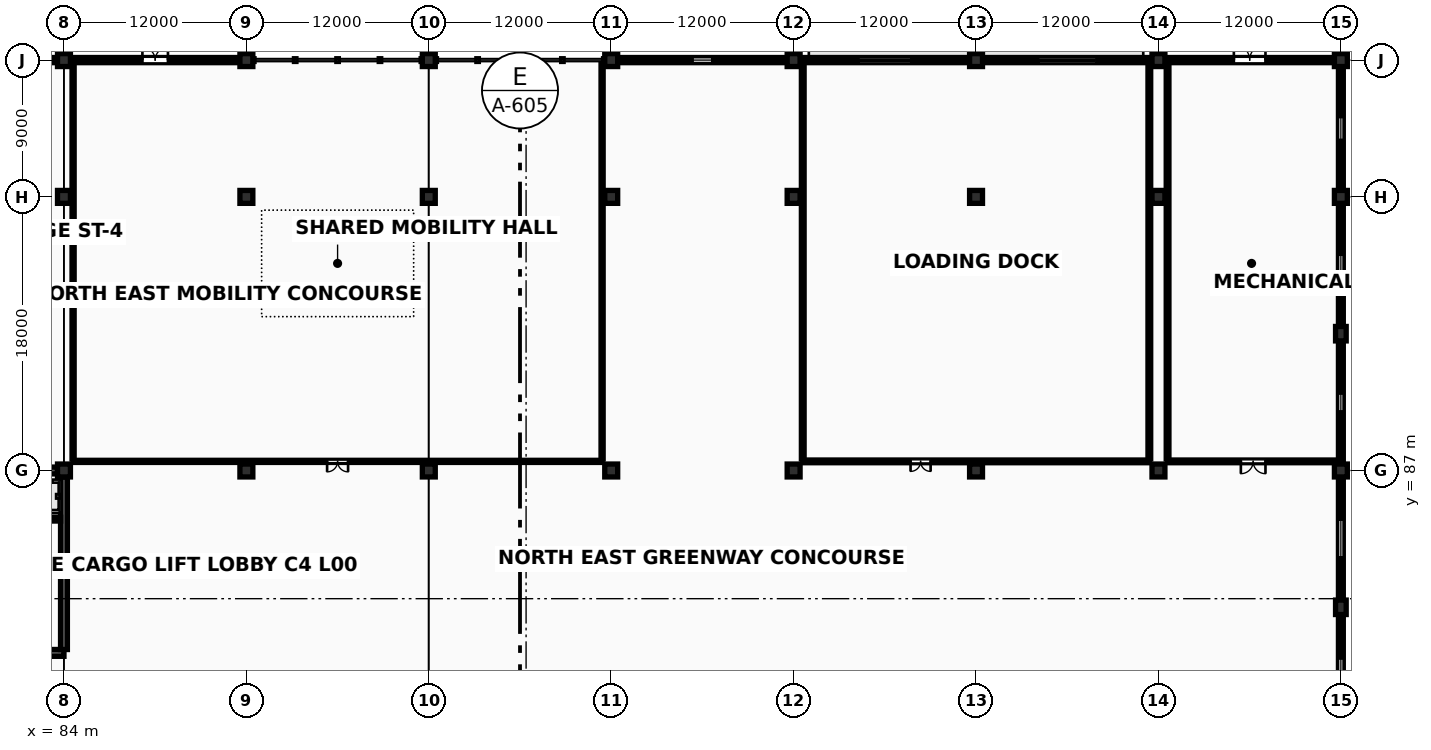
"""IFC4 building model, lengths in metres.
Left out: names, types, materials, properties, quantities, classifications, styles, units other than length and angle.
Written with IfcOpenShell. Run it as: python <this file> out.ifc"""

import sys

from ifc_helpers import new_model, si_unit, direction, frame, frame_2d, origin, origin_2d, place, context, subcontext, project, spatial, rectangle, extrude, element, fill, save


model = new_model("IFC4")
c1 = context("Model", 3, precision=1e-05, world=origin(), true_north=direction((0.0, 1.0)))
c2 = subcontext(c1, "Body", "Model", "MODEL_VIEW")
j1 = project(units=[si_unit("LENGTHUNIT", "METRE"), si_unit("PLANEANGLEUNIT", "RADIAN")], contexts=[c1])
p1 = place(None, origin())
s1 = spatial("IfcSite", under=j1, at=p1, CompositionType="ELEMENT")
p2 = place(p1, origin())
s2 = spatial("IfcBuilding", under=s1, at=p2, CompositionType="ELEMENT")
p3 = place(p2, origin())
s3 = spatial("IfcBuildingStorey", under=s2, at=p3, CompositionType="ELEMENT", Elevation=0.0)
for number, where, z_axis, x_axis in (
    (1, (84.0, 87.0, 0.0), (0.0, 0.0, 1.0), (1.0, 0.0, 0.0)),
    (2, (84.0, 105.0, 0.0), (0.0, 0.0, 1.0), (1.0, 0.0, 0.0)),
    (3, (84.0, 114.0, 0.0), (0.0, 0.0, 1.0), (1.0, 0.0, 0.0)),
    (4, (96.0, 87.0, 0.0), (0.0, 0.0, 1.0), (1.0, 0.0, 0.0)),
    (5, (96.0, 105.0, 0.0), (0.0, 0.0, 1.0), (1.0, 0.0, 0.0)),
    (6, (96.0, 114.0, 0.0), (0.0, 0.0, 1.0), (1.0, 0.0, 0.0)),
    (7, (108.0, 87.0, 0.0), (0.0, 0.0, 1.0), (1.0, 0.0, 0.0)),
    (8, (108.0, 105.0, 0.0), (0.0, 0.0, 1.0), (1.0, 0.0, 0.0)),
    (9, (108.0, 114.0, 0.0), (0.0, 0.0, 1.0), (1.0, 0.0, 0.0)),
    (10, (120.0, 87.0, 0.0), (0.0, 0.0, 1.0), (1.0, 0.0, 0.0)),
    (11, (120.0, 105.0, 0.0), (0.0, 0.0, 1.0), (1.0, 0.0, 0.0)),
    (12, (120.0, 114.0, 0.0), (0.0, 0.0, 1.0), (1.0, 0.0, 0.0)),
    (13, (132.0, 87.0, 0.0), (0.0, 0.0, 1.0), (1.0, 0.0, 0.0)),
    (14, (132.0, 105.0, 0.0), (0.0, 0.0, 1.0), (1.0, 0.0, 0.0)),
    (15, (132.0, 114.0, 0.0), (0.0, 0.0, 1.0), (1.0, 0.0, 0.0)),
    (16, (144.0, 87.0, 0.0), (0.0, 0.0, 1.0), (1.0, 0.0, 0.0)),
    (17, (144.0, 105.0, 0.0), (0.0, 0.0, 1.0), (1.0, 0.0, 0.0)),
    (18, (144.0, 114.0, 0.0), (0.0, 0.0, 1.0), (1.0, 0.0, 0.0)),
    (19, (156.0, 87.0, 0.0), (0.0, 0.0, 1.0), (1.0, 0.0, 0.0)),
    (20, (156.0, 105.0, 0.0), (0.0, 0.0, 1.0), (1.0, 0.0, 0.0)),
    (21, (156.0, 114.0, 0.0), (0.0, 0.0, 1.0), (1.0, 0.0, 0.0)),
    (22, (168.0, 87.0, 0.0), (0.0, 0.0, 1.0), (1.0, 0.0, 0.0)),
    (23, (168.0, 105.0, 0.0), (0.0, 0.0, 1.0), (1.0, 0.0, 0.0)),
    (24, (168.0, 114.0, 0.0), (0.0, 0.0, 1.0), (1.0, 0.0, 0.0)),
):
    element("IfcColumn", number, at=place(p3, frame(where, z_axis=z_axis, x_axis=x_axis)), inside=s3, PredefinedType="COLUMN", context=c2, shape_type="SweptSolid", body=[
        extrude(rectangle(XDim=0.85, YDim=0.85, at=origin_2d()), origin(), (0.0, 0.0, 1.0), 5.4),
    ])
for number, where, z_axis, x_axis in (
    (25, (168.0, 78.0, 0.0), (0.0, 0.0, 1.0), (1.0, 0.0, 0.0)),
    (26, (168.0, 96.0, 0.0), (0.0, 0.0, 1.0), (1.0, 0.0, 0.0)),
):
    element("IfcColumn", number, at=place(p3, frame(where, z_axis=z_axis, x_axis=x_axis)), inside=s3, PredefinedType="PILASTER", context=c2, shape_type="SweptSolid", body=[
        extrude(rectangle(XDim=0.7, YDim=0.95, at=origin_2d()), origin(), (0.0, 0.0, 1.0), 5.4),
    ])
p4 = place(p3, frame((72.0, 75.0, 0.0), z_axis=(0.0, 0.0, 1.0), x_axis=(1.0, 0.0, 0.0)))
e27 = element("IfcWall", 27, at=p4, inside=s3, PredefinedType="SHEAR", context=c2, shape_type="SweptSolid", body=[
    extrude(rectangle(XDim=12.0, YDim=0.45, at=frame_2d((6.0, 0.0))), origin(), (0.0, 0.0, 1.0), 5.203),
])
p5 = place(p4, frame((7.45, 0.0, 0.0)))
e28 = element("IfcOpeningElement", 28, at=p5, cuts=e27, PredefinedType="OPENING", context=c2, shape_type="SweptSolid", body=[
    extrude(rectangle(XDim=1.5, YDim=2.25, at=frame_2d((0.75, 1.125))), frame((0.0, 0.24, 0.0), z_axis=(0.0, -1.0, 0.0), x_axis=(1.0, 0.0, 0.0)), (0.0, 0.0, 1.0), 0.48),
])
p6 = place(p3, frame((72.422, 87.0, 0.0), z_axis=(0.0, 0.0, 1.0), x_axis=(1.0, 0.0, 0.0)))
e29 = element("IfcWall", 29, at=p6, inside=s3, PredefinedType="SHEAR", context=c2, shape_type="SweptSolid", body=[
    extrude(rectangle(XDim=11.156, YDim=0.45, at=frame_2d((5.578, 0.0))), origin(), (0.0, 0.0, 1.0), 5.203),
])
p7 = place(p6, frame((1.178, 0.0, 0.0)))
e30 = element("IfcOpeningElement", 30, at=p7, cuts=e29, PredefinedType="OPENING", context=c2, shape_type="SweptSolid", body=[
    extrude(rectangle(XDim=1.2, YDim=2.2, at=frame_2d((0.6, 1.1))), frame((0.0, 0.24, 0.0), z_axis=(0.0, -1.0, 0.0), x_axis=(1.0, 0.0, 0.0)), (0.0, 0.0, 1.0), 0.48),
])
p8 = place(p3, frame((84.0, 75.222, 0.0), z_axis=(0.0, 0.0, 1.0), x_axis=(0.0, 1.0, 0.0)))
e31 = element("IfcWall", 31, at=p8, inside=s3, PredefinedType="SHEAR", context=c2, shape_type="SweptSolid", body=[
    extrude(rectangle(XDim=11.356, YDim=0.45, at=frame_2d((5.678, 0.0))), origin(), (0.0, 0.0, 1.0), 5.203),
])
p9 = place(p3, frame((76.597, 83.8, 0.0), z_axis=(0.0, 0.0, 1.0), x_axis=(1.0, 0.0, 0.0)))
e32 = element("IfcWall", 32, at=p9, inside=s3, PredefinedType="SOLIDWALL", context=c2, shape_type="SweptSolid", body=[
    extrude(rectangle(XDim=7.181, YDim=0.25, at=frame_2d((3.591, 0.0))), origin(), (0.0, 0.0, 1.0), 5.203),
])
p10 = place(p9, frame((2.433, 0.0, 0.0)))
e33 = element("IfcOpeningElement", 33, at=p10, cuts=e32, PredefinedType="OPENING", context=c2, shape_type="SweptSolid", body=[
    extrude(rectangle(XDim=1.3, YDim=2.28, at=frame_2d((0.65, 1.14))), frame((0.0, 0.14, 0.0), z_axis=(0.0, -1.0, 0.0), x_axis=(1.0, 0.0, 0.0)), (0.0, 0.0, 1.0), 0.28),
])
p11 = place(p9, frame((5.203, 0.0, 0.0)))
e34 = element("IfcOpeningElement", 34, at=p11, cuts=e32, PredefinedType="OPENING", context=c2, shape_type="SweptSolid", body=[
    extrude(rectangle(XDim=1.3, YDim=2.28, at=frame_2d((0.65, 1.14))), frame((0.0, 0.14, 0.0), z_axis=(0.0, -1.0, 0.0), x_axis=(1.0, 0.0, 0.0)), (0.0, 0.0, 1.0), 0.28),
])
p12 = place(p3, frame((72.423, 114.0, 0.0), z_axis=(0.0, 0.0, 1.0), x_axis=(1.0, 0.0, 0.0)))
e35 = element("IfcWall", 35, at=p12, inside=s3, PredefinedType="SOLIDWALL", context=c2, shape_type="SweptSolid", body=[
    extrude(rectangle(XDim=11.154, YDim=0.34, at=frame_2d((5.577, 0.0))), origin(), (0.0, 0.0, 1.0), 3.85),
])
p13 = place(p12, frame((4.797, 0.0, 0.0)))
e36 = element("IfcOpeningElement", 36, at=p13, cuts=e35, PredefinedType="OPENING", context=c2, shape_type="SweptSolid", body=[
    extrude(rectangle(XDim=1.56, YDim=2.3, at=frame_2d((0.78, 1.15))), frame((0.0, 0.185, 0.0), z_axis=(0.0, -1.0, 0.0), x_axis=(1.0, 0.0, 0.0)), (0.0, 0.0, 1.0), 0.37),
])
p14 = place(p3, frame((84.423, 114.0, 0.0), z_axis=(0.0, 0.0, 1.0), x_axis=(1.0, 0.0, 0.0)))
e37 = element("IfcWall", 37, at=p14, inside=s3, PredefinedType="SOLIDWALL", context=c2, shape_type="SweptSolid", body=[
    extrude(rectangle(XDim=11.154, YDim=0.34, at=frame_2d((5.577, 0.0))), origin(), (0.0, 0.0, 1.0), 3.85),
])
p15 = place(p14, frame((4.737, 0.0, 0.0)))
e38 = element("IfcOpeningElement", 38, at=p15, cuts=e37, PredefinedType="OPENING", context=c2, shape_type="SweptSolid", body=[
    extrude(rectangle(XDim=1.68, YDim=2.34, at=frame_2d((0.84, 1.17))), frame((0.0, 0.185, 0.0), z_axis=(0.0, -1.0, 0.0), x_axis=(1.0, 0.0, 0.0)), (0.0, 0.0, 1.0), 0.37),
])
p16 = place(p3, frame((120.423, 114.0, 0.0), z_axis=(0.0, 0.0, 1.0), x_axis=(1.0, 0.0, 0.0)))
e39 = element("IfcWall", 39, at=p16, inside=s3, PredefinedType="SOLIDWALL", context=c2, shape_type="SweptSolid", body=[
    extrude(rectangle(XDim=11.154, YDim=0.34, at=frame_2d((5.577, 0.0))), origin(), (0.0, 0.0, 1.0), 3.85),
])
p17 = place(p16, frame((4.927, 0.0, 0.85)))
e40 = element("IfcOpeningElement", 40, at=p17, cuts=e39, PredefinedType="OPENING", context=c2, shape_type="SweptSolid", body=[
    extrude(rectangle(XDim=1.3, YDim=1.25, at=frame_2d((0.65, 0.625))), frame((0.0, 0.185, 0.0), z_axis=(0.0, -1.0, 0.0), x_axis=(1.0, 0.0, 0.0)), (0.0, 0.0, 1.0), 0.37),
])
p18 = place(p3, frame((132.423, 114.0, 0.0), z_axis=(0.0, 0.0, 1.0), x_axis=(1.0, 0.0, 0.0)))
e41 = element("IfcWall", 41, at=p18, inside=s3, PredefinedType="SOLIDWALL", context=c2, shape_type="SweptSolid", body=[
    extrude(rectangle(XDim=11.154, YDim=0.34, at=frame_2d((5.577, 0.0))), origin(), (0.0, 0.0, 1.0), 3.85),
])
p19 = place(p18, frame((3.877, 0.0, 0.0)))
e42 = element("IfcOpeningElement", 42, at=p19, cuts=e41, PredefinedType="OPENING", context=c2, shape_type="SweptSolid", body=[
    extrude(rectangle(XDim=3.4, YDim=2.85, at=frame_2d((1.7, 1.425))), frame((0.0, 0.185, 0.0), z_axis=(0.0, -1.0, 0.0), x_axis=(1.0, 0.0, 0.0)), (0.0, 0.0, 1.0), 0.37),
])
p20 = place(p3, frame((144.423, 114.0, 0.0), z_axis=(0.0, 0.0, 1.0), x_axis=(1.0, 0.0, 0.0)))
e43 = element("IfcWall", 43, at=p20, inside=s3, PredefinedType="SOLIDWALL", context=c2, shape_type="SweptSolid", body=[
    extrude(rectangle(XDim=11.154, YDim=0.34, at=frame_2d((5.577, 0.0))), origin(), (0.0, 0.0, 1.0), 3.85),
])
p21 = place(p20, frame((3.697, 0.0, 0.0)))
e44 = element("IfcOpeningElement", 44, at=p21, cuts=e43, PredefinedType="OPENING", context=c2, shape_type="SweptSolid", body=[
    extrude(rectangle(XDim=3.76, YDim=3.0, at=frame_2d((1.88, 1.5))), frame((0.0, 0.185, 0.0), z_axis=(0.0, -1.0, 0.0), x_axis=(1.0, 0.0, 0.0)), (0.0, 0.0, 1.0), 0.37),
])
p22 = place(p3, frame((156.423, 114.0, 0.0), z_axis=(0.0, 0.0, 1.0), x_axis=(1.0, 0.0, 0.0)))
e45 = element("IfcWall", 45, at=p22, inside=s3, PredefinedType="SOLIDWALL", context=c2, shape_type="SweptSolid", body=[
    extrude(rectangle(XDim=11.154, YDim=0.34, at=frame_2d((5.577, 0.0))), origin(), (0.0, 0.0, 1.0), 3.85),
])
p23 = place(p22, frame((4.537, 0.0, 0.0)))
e46 = element("IfcOpeningElement", 46, at=p23, cuts=e45, PredefinedType="OPENING", context=c2, shape_type="SweptSolid", body=[
    extrude(rectangle(XDim=2.08, YDim=2.44, at=frame_2d((1.04, 1.22))), frame((0.0, 0.185, 0.0), z_axis=(0.0, -1.0, 0.0), x_axis=(1.0, 0.0, 0.0)), (0.0, 0.0, 1.0), 0.37),
])
p24 = place(p3, frame((168.0, 69.423, 0.0), z_axis=(0.0, 0.0, 1.0), x_axis=(0.0, 1.0, 0.0)))
e47 = element("IfcWall", 47, at=p24, inside=s3, PredefinedType="SOLIDWALL", context=c2, shape_type="SweptSolid", body=[
    extrude(rectangle(XDim=8.104, YDim=0.32, at=frame_2d((4.052, 0.0))), origin(), (0.0, 0.0, 1.0), 3.85),
])
p25 = place(p24, frame((2.892, 0.0, 0.55)))
e48 = element("IfcOpeningElement", 48, at=p25, cuts=e47, PredefinedType="OPENING", context=c2, shape_type="SweptSolid", body=[
    extrude(rectangle(XDim=2.32, YDim=1.42, at=frame_2d((1.16, 0.71))), frame((0.0, 0.175, 0.0), z_axis=(0.0, -1.0, 0.0), x_axis=(1.0, 0.0, 0.0)), (0.0, 0.0, 1.0), 0.35),
])
p26 = place(p3, frame((168.0, 78.473, 0.0), z_axis=(0.0, 0.0, 1.0), x_axis=(0.0, 1.0, 0.0)))
e49 = element("IfcWall", 49, at=p26, inside=s3, PredefinedType="SOLIDWALL", context=c2, shape_type="SweptSolid", body=[
    extrude(rectangle(XDim=8.104, YDim=0.32, at=frame_2d((4.052, 0.0))), origin(), (0.0, 0.0, 1.0), 3.85),
])
p27 = place(p26, frame((2.812, 0.0, 0.55)))
e50 = element("IfcOpeningElement", 50, at=p27, cuts=e49, PredefinedType="OPENING", context=c2, shape_type="SweptSolid", body=[
    extrude(rectangle(XDim=2.48, YDim=1.42, at=frame_2d((1.24, 0.71))), frame((0.0, 0.175, 0.0), z_axis=(0.0, -1.0, 0.0), x_axis=(1.0, 0.0, 0.0)), (0.0, 0.0, 1.0), 0.35),
])
p28 = place(p3, frame((168.0, 87.423, 0.0), z_axis=(0.0, 0.0, 1.0), x_axis=(0.0, 1.0, 0.0)))
e51 = element("IfcWall", 51, at=p28, inside=s3, PredefinedType="SOLIDWALL", context=c2, shape_type="SweptSolid", body=[
    extrude(rectangle(XDim=8.104, YDim=0.32, at=frame_2d((4.052, 0.0))), origin(), (0.0, 0.0, 1.0), 3.85),
])
p29 = place(p28, frame((3.462, 0.0, 0.55)))
e52 = element("IfcOpeningElement", 52, at=p29, cuts=e51, PredefinedType="OPENING", context=c2, shape_type="SweptSolid", body=[
    extrude(rectangle(XDim=1.18, YDim=1.58, at=frame_2d((0.59, 0.79))), frame((0.0, 0.175, 0.0), z_axis=(0.0, -1.0, 0.0), x_axis=(1.0, 0.0, 0.0)), (0.0, 0.0, 1.0), 0.35),
])
p30 = place(p3, frame((168.0, 96.473, 0.0), z_axis=(0.0, 0.0, 1.0), x_axis=(0.0, 1.0, 0.0)))
e53 = element("IfcWall", 53, at=p30, inside=s3, PredefinedType="SOLIDWALL", context=c2, shape_type="SweptSolid", body=[
    extrude(rectangle(XDim=8.104, YDim=0.32, at=frame_2d((4.052, 0.0))), origin(), (0.0, 0.0, 1.0), 3.85),
])
p31 = place(p30, frame((3.382, 0.0, 0.55)))
e54 = element("IfcOpeningElement", 54, at=p31, cuts=e53, PredefinedType="OPENING", context=c2, shape_type="SweptSolid", body=[
    extrude(rectangle(XDim=1.34, YDim=1.58, at=frame_2d((0.67, 0.79))), frame((0.0, 0.175, 0.0), z_axis=(0.0, -1.0, 0.0), x_axis=(1.0, 0.0, 0.0)), (0.0, 0.0, 1.0), 0.35),
])
p32 = place(p3, frame((168.0, 105.423, 0.0), z_axis=(0.0, 0.0, 1.0), x_axis=(0.0, 1.0, 0.0)))
e55 = element("IfcWall", 55, at=p32, inside=s3, PredefinedType="SOLIDWALL", context=c2, shape_type="SweptSolid", body=[
    extrude(rectangle(XDim=8.154, YDim=0.32, at=frame_2d((4.077, 0.0))), origin(), (0.0, 0.0, 1.0), 3.85),
])
p33 = place(p32, frame((3.327, 0.0, 0.55)))
e56 = element("IfcOpeningElement", 56, at=p33, cuts=e55, PredefinedType="OPENING", context=c2, shape_type="SweptSolid", body=[
    extrude(rectangle(XDim=1.5, YDim=1.58, at=frame_2d((0.75, 0.79))), frame((0.0, 0.175, 0.0), z_axis=(0.0, -1.0, 0.0), x_axis=(1.0, 0.0, 0.0)), (0.0, 0.0, 1.0), 0.35),
])
p34 = place(p3, frame((84.6, 87.6, 0.0), z_axis=(0.0, 0.0, 1.0), x_axis=(1.0, 0.0, 0.0)))
e57 = element("IfcWall", 57, at=p34, inside=s3, PredefinedType="PARTITIONING", context=c2, shape_type="SweptSolid", body=[
    extrude(rectangle(XDim=34.8, YDim=0.14, at=frame_2d((17.4, 0.0))), origin(), (0.0, 0.0, 1.0), 2.75),
])
p35 = place(p34, frame((16.71, 0.0, 0.0)))
e58 = element("IfcOpeningElement", 58, at=p35, cuts=e57, PredefinedType="OPENING", context=c2, shape_type="SweptSolid", body=[
    extrude(rectangle(XDim=1.38, YDim=2.23, at=frame_2d((0.69, 1.115))), frame((0.0, 0.085, 0.0), z_axis=(0.0, -1.0, 0.0), x_axis=(1.0, 0.0, 0.0)), (0.0, 0.0, 1.0), 0.17),
])
for number, where, z_axis, x_axis in (
    (59, (84.6, 87.76, 0.0), (0.0, 0.0, 1.0), (0.0, 1.0, 0.0)),
    (60, (119.4, 87.76, 0.0), (0.0, 0.0, 1.0), (0.0, 1.0, 0.0)),
):
    element("IfcWall", number, at=place(p3, frame(where, z_axis=z_axis, x_axis=x_axis)), inside=s3, PredefinedType="PARTITIONING", context=c2, shape_type="SweptSolid", body=[
        extrude(rectangle(XDim=26.1, YDim=0.14, at=frame_2d((13.05, 0.0))), origin(), (0.0, 0.0, 1.0), 2.75),
    ])
p36 = place(p3, frame((132.6, 87.6, 0.0), z_axis=(0.0, 0.0, 1.0), x_axis=(1.0, 0.0, 0.0)))
e61 = element("IfcWall", 61, at=p36, inside=s3, PredefinedType="SOLIDWALL", context=c2, shape_type="SweptSolid", body=[
    extrude(rectangle(XDim=22.8, YDim=0.18, at=frame_2d((11.4, 0.0))), origin(), (0.0, 0.0, 1.0), 2.75),
])
p37 = place(p36, frame((7.092, 0.0, 0.0)))
e62 = element("IfcOpeningElement", 62, at=p37, cuts=e61, PredefinedType="OPENING", context=c2, shape_type="SweptSolid", body=[
    extrude(rectangle(XDim=1.32, YDim=2.26, at=frame_2d((0.66, 1.13))), frame((0.0, 0.105, 0.0), z_axis=(0.0, -1.0, 0.0), x_axis=(1.0, 0.0, 0.0)), (0.0, 0.0, 1.0), 0.21),
])
for number, where, z_axis, x_axis in (
    (63, (132.6, 87.76, 0.0), (0.0, 0.0, 1.0), (0.0, 1.0, 0.0)),
    (64, (155.4, 87.76, 0.0), (0.0, 0.0, 1.0), (0.0, 1.0, 0.0)),
):
    element("IfcWall", number, at=place(p3, frame(where, z_axis=z_axis, x_axis=x_axis)), inside=s3, PredefinedType="SOLIDWALL", context=c2, shape_type="SweptSolid", body=[
        extrude(rectangle(XDim=26.1, YDim=0.18, at=frame_2d((13.05, 0.0))), origin(), (0.0, 0.0, 1.0), 2.75),
    ])
p38 = place(p3, frame((156.6, 87.6, 0.0), z_axis=(0.0, 0.0, 1.0), x_axis=(1.0, 0.0, 0.0)))
e65 = element("IfcWall", 65, at=p38, inside=s3, PredefinedType="SOLIDWALL", context=c2, shape_type="SweptSolid", body=[
    extrude(rectangle(XDim=11.26, YDim=0.18, at=frame_2d((5.63, 0.0))), origin(), (0.0, 0.0, 1.0), 2.75),
])
p39 = place(p38, frame((4.82, 0.0, 0.0)))
e66 = element("IfcOpeningElement", 66, at=p39, cuts=e65, PredefinedType="OPENING", context=c2, shape_type="SweptSolid", body=[
    extrude(rectangle(XDim=1.62, YDim=2.3, at=frame_2d((0.81, 1.15))), frame((0.0, 0.105, 0.0), z_axis=(0.0, -1.0, 0.0), x_axis=(1.0, 0.0, 0.0)), (0.0, 0.0, 1.0), 0.21),
])
p40 = place(p3, frame((156.6, 87.76, 0.0), z_axis=(0.0, 0.0, 1.0), x_axis=(0.0, 1.0, 0.0)))
e67 = element("IfcWall", 67, at=p40, inside=s3, PredefinedType="SOLIDWALL", context=c2, shape_type="SweptSolid", body=[
    extrude(rectangle(XDim=26.1, YDim=0.18, at=frame_2d((13.05, 0.0))), origin(), (0.0, 0.0, 1.0), 2.75),
])
p41 = place(p15, origin())
e68 = element("IfcDoor", 68, at=p41, inside=s3, OperationType="DOUBLE_DOOR_SINGLE_SWING", PredefinedType="DOOR", context=c2, shape_type="SweptSolid", body=[
    extrude(rectangle(XDim=1.68, YDim=2.34, at=frame_2d((0.84, 1.17))), frame((0.0, 0.025, 0.0), z_axis=(0.0, -1.0, 0.0), x_axis=(1.0, 0.0, 0.0)), (0.0, 0.0, 1.0), 0.05),
])
fill(e38, e68)
p42 = place(p17, origin())
e69 = element("IfcWindow", 69, at=p42, inside=s3, PartitioningType="SINGLE_PANEL", PredefinedType="WINDOW", context=c2, shape_type="SweptSolid", body=[
    extrude(rectangle(XDim=1.3, YDim=1.25, at=frame_2d((0.65, 0.625))), frame((0.0, 0.03, 0.0), z_axis=(0.0, -1.0, 0.0), x_axis=(1.0, 0.0, 0.0)), (0.0, 0.0, 1.0), 0.06),
])
fill(e40, e69)
p43 = place(p19, origin())
e70 = element("IfcDoor", 70, at=p43, inside=s3, OperationType="ROLLINGUP", PredefinedType="USERDEFINED", context=c2, shape_type="SweptSolid", body=[
    extrude(rectangle(XDim=3.4, YDim=2.85, at=frame_2d((1.7, 1.425))), frame((0.0, 0.025, 0.0), z_axis=(0.0, -1.0, 0.0), x_axis=(1.0, 0.0, 0.0)), (0.0, 0.0, 1.0), 0.05),
])
fill(e42, e70)
p44 = place(p21, origin())
e71 = element("IfcDoor", 71, at=p44, inside=s3, OperationType="ROLLINGUP", PredefinedType="USERDEFINED", context=c2, shape_type="SweptSolid", body=[
    extrude(rectangle(XDim=3.76, YDim=3.0, at=frame_2d((1.88, 1.5))), frame((0.0, 0.025, 0.0), z_axis=(0.0, -1.0, 0.0), x_axis=(1.0, 0.0, 0.0)), (0.0, 0.0, 1.0), 0.05),
])
fill(e44, e71)
p45 = place(p23, origin())
e72 = element("IfcDoor", 72, at=p45, inside=s3, OperationType="DOUBLE_DOOR_SINGLE_SWING", PredefinedType="DOOR", context=c2, shape_type="SweptSolid", body=[
    extrude(rectangle(XDim=2.08, YDim=2.44, at=frame_2d((1.04, 1.22))), frame((0.0, 0.025, 0.0), z_axis=(0.0, -1.0, 0.0), x_axis=(1.0, 0.0, 0.0)), (0.0, 0.0, 1.0), 0.05),
])
fill(e46, e72)
p46 = place(p25, origin())
e73 = element("IfcWindow", 73, at=p46, inside=s3, PartitioningType="DOUBLE_PANEL_VERTICAL", PredefinedType="WINDOW", context=c2, shape_type="SweptSolid", body=[
    extrude(rectangle(XDim=2.32, YDim=1.42, at=frame_2d((1.16, 0.71))), frame((0.0, 0.03, 0.0), z_axis=(0.0, -1.0, 0.0), x_axis=(1.0, 0.0, 0.0)), (0.0, 0.0, 1.0), 0.06),
])
fill(e48, e73)
p47 = place(p27, origin())
e74 = element("IfcWindow", 74, at=p47, inside=s3, PartitioningType="DOUBLE_PANEL_VERTICAL", PredefinedType="WINDOW", context=c2, shape_type="SweptSolid", body=[
    extrude(rectangle(XDim=2.48, YDim=1.42, at=frame_2d((1.24, 0.71))), frame((0.0, 0.03, 0.0), z_axis=(0.0, -1.0, 0.0), x_axis=(1.0, 0.0, 0.0)), (0.0, 0.0, 1.0), 0.06),
])
fill(e50, e74)
p48 = place(p29, origin())
e75 = element("IfcWindow", 75, at=p48, inside=s3, PartitioningType="SINGLE_PANEL", PredefinedType="WINDOW", context=c2, shape_type="SweptSolid", body=[
    extrude(rectangle(XDim=1.18, YDim=1.58, at=frame_2d((0.59, 0.79))), frame((0.0, 0.03, 0.0), z_axis=(0.0, -1.0, 0.0), x_axis=(1.0, 0.0, 0.0)), (0.0, 0.0, 1.0), 0.06),
])
fill(e52, e75)
p49 = place(p31, origin())
e76 = element("IfcWindow", 76, at=p49, inside=s3, PartitioningType="SINGLE_PANEL", PredefinedType="WINDOW", context=c2, shape_type="SweptSolid", body=[
    extrude(rectangle(XDim=1.34, YDim=1.58, at=frame_2d((0.67, 0.79))), frame((0.0, 0.03, 0.0), z_axis=(0.0, -1.0, 0.0), x_axis=(1.0, 0.0, 0.0)), (0.0, 0.0, 1.0), 0.06),
])
fill(e54, e76)
p50 = place(p33, origin())
e77 = element("IfcWindow", 77, at=p50, inside=s3, PartitioningType="SINGLE_PANEL", PredefinedType="WINDOW", context=c2, shape_type="SweptSolid", body=[
    extrude(rectangle(XDim=1.5, YDim=1.58, at=frame_2d((0.75, 0.79))), frame((0.0, 0.03, 0.0), z_axis=(0.0, -1.0, 0.0), x_axis=(1.0, 0.0, 0.0)), (0.0, 0.0, 1.0), 0.06),
])
fill(e56, e77)
p51 = place(p35, origin())
e78 = element("IfcDoor", 78, at=p51, inside=s3, OperationType="DOUBLE_DOOR_SINGLE_SWING", PredefinedType="DOOR", context=c2, shape_type="SweptSolid", body=[
    extrude(rectangle(XDim=1.38, YDim=2.23, at=frame_2d((0.69, 1.115))), frame((0.0, 0.025, 0.0), z_axis=(0.0, -1.0, 0.0), x_axis=(1.0, 0.0, 0.0)), (0.0, 0.0, 1.0), 0.05),
])
fill(e58, e78)
p52 = place(p37, origin())
e79 = element("IfcDoor", 79, at=p52, inside=s3, OperationType="DOUBLE_DOOR_SINGLE_SWING", PredefinedType="DOOR", context=c2, shape_type="SweptSolid", body=[
    extrude(rectangle(XDim=1.32, YDim=2.26, at=frame_2d((0.66, 1.13))), frame((0.0, 0.025, 0.0), z_axis=(0.0, -1.0, 0.0), x_axis=(1.0, 0.0, 0.0)), (0.0, 0.0, 1.0), 0.05),
])
fill(e62, e79)
p53 = place(p39, origin())
e80 = element("IfcDoor", 80, at=p53, inside=s3, OperationType="DOUBLE_DOOR_SINGLE_SWING", PredefinedType="DOOR", context=c2, shape_type="SweptSolid", body=[
    extrude(rectangle(XDim=1.62, YDim=2.3, at=frame_2d((0.81, 1.15))), frame((0.0, 0.025, 0.0), z_axis=(0.0, -1.0, 0.0), x_axis=(1.0, 0.0, 0.0)), (0.0, 0.0, 1.0), 0.05),
])
fill(e66, e80)
save(model, sys.argv[1])
